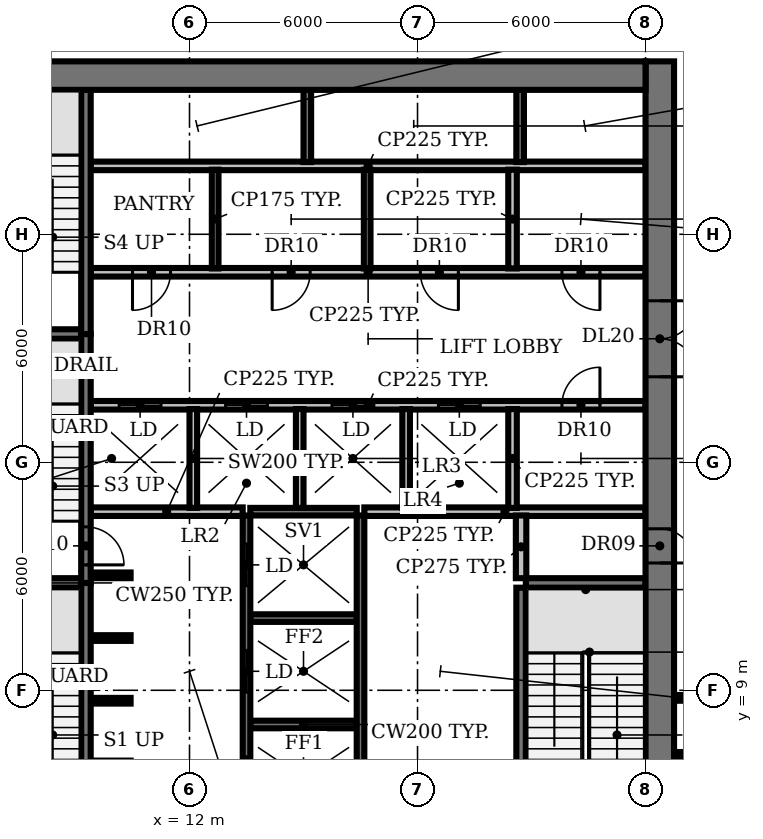
"""IFC4 building model, lengths in metres.
Left out: names, types, materials, properties, quantities, classifications, styles, units other than length and angle.
Written with IfcOpenShell. Run it as: python <this file> out.ifc"""

import sys

from ifc_helpers import new_model, si_unit, direction, frame, frame_2d, origin, place, context, subcontext, project, spatial, rectangle, extrude, element, fill, save


model = new_model("IFC4")
c1 = context("Model", 3, precision=1e-05, world=origin(), true_north=direction((0.0, 1.0)))
c2 = subcontext(c1, "Body", "Model", "MODEL_VIEW")
j1 = project(units=[si_unit("LENGTHUNIT", "METRE"), si_unit("PLANEANGLEUNIT", "RADIAN")], contexts=[c1])
p1 = place(None, origin())
s1 = spatial("IfcSite", under=j1, at=p1, CompositionType="ELEMENT")
p2 = place(p1, origin())
s2 = spatial("IfcBuilding", under=s1, at=p2, CompositionType="ELEMENT")
p3 = place(p2, frame((0.0, 0.0, 125.6)))
s3 = spatial("IfcBuildingStorey", under=s2, at=p3, CompositionType="ELEMENT", Elevation=125.6)
p4 = place(p3, frame((13.6, 8.1, 0.0), z_axis=(0.0, 0.0, 1.0), x_axis=(1.0, 0.0, 0.0)))
e1 = element("IfcWall", 1, at=p4, inside=s3, PredefinedType="SHEAR", context=c2, shape_type="SweptSolid", body=[
    extrude(rectangle(XDim=2.8, YDim=0.2, at=frame_2d((1.4, 0.0))), origin(), (0.0, 0.0, 1.0), 3.85),
])
for number, where, z_axis, x_axis in (
    (2, (9.4, 8.725, 0.0), (0.0, 0.0, 1.0), (1.0, 0.0, 0.0)),
    (3, (9.4, 10.375, 0.0), (0.0, 0.0, 1.0), (1.0, 0.0, 0.0)),
):
    element("IfcWall", number, at=place(p3, frame(where, z_axis=z_axis, x_axis=x_axis)), inside=s3, PredefinedType="SHEAR", context=c2, shape_type="SweptSolid", body=[
        extrude(rectangle(XDim=1.05, YDim=0.15, at=frame_2d((0.525, 0.0))), origin(), (0.0, 0.0, 1.0), 3.85),
    ])
p5 = place(p3, frame((13.6, 10.9, 0.0), z_axis=(0.0, 0.0, 1.0), x_axis=(1.0, 0.0, 0.0)))
e4 = element("IfcWall", 4, at=p5, inside=s3, PredefinedType="SHEAR", context=c2, shape_type="SweptSolid", body=[
    extrude(rectangle(XDim=2.8, YDim=0.2, at=frame_2d((1.4, 0.0))), origin(), (0.0, 0.0, 1.0), 3.85),
])
for number, where, z_axis, x_axis in (
    (5, (6.0, 11.825, 0.0), (0.0, 0.0, 1.0), (1.0, 0.0, 0.0)),
    (6, (20.85, 11.825, 0.0), (0.0, 0.0, 1.0), (1.0, 0.0, 0.0)),
):
    element("IfcWall", number, at=place(p3, frame(where, z_axis=z_axis, x_axis=x_axis)), inside=s3, PredefinedType="SHEAR", context=c2, shape_type="SweptSolid", body=[
        extrude(rectangle(XDim=3.15, YDim=0.25, at=frame_2d((1.575, 0.0))), origin(), (0.0, 0.0, 1.0), 3.85),
    ])
p6 = place(p3, frame((9.4, 12.025, 0.0), z_axis=(0.0, 0.0, 1.0), x_axis=(1.0, 0.0, 0.0)))
e7 = element("IfcWall", 7, at=p6, inside=s3, PredefinedType="SHEAR", context=c2, shape_type="SweptSolid", body=[
    extrude(rectangle(XDim=1.05, YDim=0.15, at=frame_2d((0.525, 0.0))), origin(), (0.0, 0.0, 1.0), 3.85),
])
p7 = place(p3, frame((9.4, 13.7, 0.0), z_axis=(0.0, 0.0, 1.0), x_axis=(1.0, 0.0, 0.0)))
e8 = element("IfcWall", 8, at=p7, inside=s3, PredefinedType="PARTITIONING", context=c2, shape_type="SweptSolid", body=[
    extrude(rectangle(XDim=4.0, YDim=0.225, at=frame_2d((2.0, 0.0))), origin(), (0.0, 0.0, 1.0), 3.85),
])
p8 = place(p3, frame((13.6, 13.7, 0.0), z_axis=(0.0, 0.0, 1.0), x_axis=(1.0, 0.0, 0.0)))
e9 = element("IfcWall", 9, at=p8, inside=s3, PredefinedType="SHEAR", context=c2, shape_type="SweptSolid", body=[
    extrude(rectangle(XDim=2.8, YDim=0.2, at=frame_2d((1.4, 0.0))), origin(), (0.0, 0.0, 1.0), 3.85),
])
p9 = place(p3, frame((16.6, 13.7, 0.0), z_axis=(0.0, 0.0, 1.0), x_axis=(1.0, 0.0, 0.0)))
e10 = element("IfcWall", 10, at=p9, inside=s3, PredefinedType="PARTITIONING", context=c2, shape_type="SweptSolid", body=[
    extrude(rectangle(XDim=7.4, YDim=0.225, at=frame_2d((3.7, 0.0))), origin(), (0.0, 0.0, 1.0), 3.85),
])
p10 = place(p3, frame((9.4, 16.5, 0.0), z_axis=(0.0, 0.0, 1.0), x_axis=(1.0, 0.0, 0.0)))
e11 = element("IfcWall", 11, at=p10, inside=s3, PredefinedType="PARTITIONING", context=c2, shape_type="SweptSolid", body=[
    extrude(rectangle(XDim=14.6, YDim=0.225, at=frame_2d((7.3, 0.0))), origin(), (0.0, 0.0, 1.0), 3.85),
])
p11 = place(p10, frame((0.75, 0.0, 0.0)))
e12 = element("IfcOpeningElement", 12, at=p11, cuts=e11, PredefinedType="OPENING", context=c2, shape_type="SweptSolid", body=[
    extrude(rectangle(XDim=1.1, YDim=2.1, at=frame_2d((0.55, 1.05))), frame((0.0, 0.123, 0.0), z_axis=(0.0, -1.0, 0.0), x_axis=(1.0, 0.0, 0.0)), (0.0, 0.0, 1.0), 0.245),
])
p12 = place(p10, frame((3.55, 0.0, 0.0)))
e13 = element("IfcOpeningElement", 13, at=p12, cuts=e11, PredefinedType="OPENING", context=c2, shape_type="SweptSolid", body=[
    extrude(rectangle(XDim=1.1, YDim=2.1, at=frame_2d((0.55, 1.05))), frame((0.0, 0.123, 0.0), z_axis=(0.0, -1.0, 0.0), x_axis=(1.0, 0.0, 0.0)), (0.0, 0.0, 1.0), 0.245),
])
p13 = place(p10, frame((6.35, 0.0, 0.0)))
e14 = element("IfcOpeningElement", 14, at=p13, cuts=e11, PredefinedType="OPENING", context=c2, shape_type="SweptSolid", body=[
    extrude(rectangle(XDim=1.1, YDim=2.1, at=frame_2d((0.55, 1.05))), frame((0.0, 0.123, 0.0), z_axis=(0.0, -1.0, 0.0), x_axis=(1.0, 0.0, 0.0)), (0.0, 0.0, 1.0), 0.245),
])
p14 = place(p10, frame((9.15, 0.0, 0.0)))
e15 = element("IfcOpeningElement", 15, at=p14, cuts=e11, PredefinedType="OPENING", context=c2, shape_type="SweptSolid", body=[
    extrude(rectangle(XDim=1.1, YDim=2.1, at=frame_2d((0.55, 1.05))), frame((0.0, 0.123, 0.0), z_axis=(0.0, -1.0, 0.0), x_axis=(1.0, 0.0, 0.0)), (0.0, 0.0, 1.0), 0.245),
])
p15 = place(p10, frame((12.4, 0.0, 0.0)))
e16 = element("IfcOpeningElement", 16, at=p15, cuts=e11, PredefinedType="OPENING", context=c2, shape_type="SweptSolid", body=[
    extrude(rectangle(XDim=1.0, YDim=2.1, at=frame_2d((0.5, 1.05))), frame((0.0, 0.123, 0.0), z_axis=(0.0, -1.0, 0.0), x_axis=(1.0, 0.0, 0.0)), (0.0, 0.0, 1.0), 0.245),
])
p16 = place(p3, frame((6.0, 18.375, 0.0), z_axis=(0.0, 0.0, 1.0), x_axis=(1.0, 0.0, 0.0)))
e17 = element("IfcWall", 17, at=p16, inside=s3, PredefinedType="SHEAR", context=c2, shape_type="SweptSolid", body=[
    extrude(rectangle(XDim=3.15, YDim=0.25, at=frame_2d((1.575, 0.0))), origin(), (0.0, 0.0, 1.0), 3.85),
])
p17 = place(p3, frame((24.0, 20.0, 0.0), z_axis=(0.0, 0.0, 1.0), x_axis=(-1.0, 0.0, 0.0)))
e18 = element("IfcWall", 18, at=p17, inside=s3, PredefinedType="PARTITIONING", context=c2, shape_type="SweptSolid", body=[
    extrude(rectangle(XDim=14.6, YDim=0.225, at=frame_2d((7.3, 0.0))), origin(), (0.0, 0.0, 1.0), 3.85),
])
p18 = place(p17, frame((12.5, 0.0, 0.0)))
e19 = element("IfcOpeningElement", 19, at=p18, cuts=e18, PredefinedType="OPENING", context=c2, shape_type="SweptSolid", body=[
    extrude(rectangle(XDim=1.0, YDim=2.1, at=frame_2d((0.5, 1.05))), frame((0.0, 0.123, 0.0), z_axis=(0.0, -1.0, 0.0), x_axis=(1.0, 0.0, 0.0)), (0.0, 0.0, 1.0), 0.245),
])
p19 = place(p17, frame((8.825, 0.0, 0.0)))
e20 = element("IfcOpeningElement", 20, at=p19, cuts=e18, PredefinedType="OPENING", context=c2, shape_type="SweptSolid", body=[
    extrude(rectangle(XDim=1.0, YDim=2.1, at=frame_2d((0.5, 1.05))), frame((0.0, 0.123, 0.0), z_axis=(0.0, -1.0, 0.0), x_axis=(1.0, 0.0, 0.0)), (0.0, 0.0, 1.0), 0.245),
])
p20 = place(p17, frame((4.925, 0.0, 0.0)))
e21 = element("IfcOpeningElement", 21, at=p20, cuts=e18, PredefinedType="OPENING", context=c2, shape_type="SweptSolid", body=[
    extrude(rectangle(XDim=1.0, YDim=2.1, at=frame_2d((0.5, 1.05))), frame((0.0, 0.123, 0.0), z_axis=(0.0, -1.0, 0.0), x_axis=(1.0, 0.0, 0.0)), (0.0, 0.0, 1.0), 0.245),
])
p21 = place(p17, frame((1.2, 0.0, 0.0)))
e22 = element("IfcOpeningElement", 22, at=p21, cuts=e18, PredefinedType="OPENING", context=c2, shape_type="SweptSolid", body=[
    extrude(rectangle(XDim=1.0, YDim=2.1, at=frame_2d((0.5, 1.05))), frame((0.0, 0.123, 0.0), z_axis=(0.0, -1.0, 0.0), x_axis=(1.0, 0.0, 0.0)), (0.0, 0.0, 1.0), 0.245),
])
p22 = place(p3, frame((9.4, 22.8, 0.0), z_axis=(0.0, 0.0, 1.0), x_axis=(1.0, 0.0, 0.0)))
e23 = element("IfcWall", 23, at=p22, inside=s3, PredefinedType="PARTITIONING", context=c2, shape_type="SweptSolid", body=[
    extrude(rectangle(XDim=14.6, YDim=0.225, at=frame_2d((7.3, 0.0))), origin(), (0.0, 0.0, 1.0), 3.85),
])
p23 = place(p3, frame((9.275, 11.825, 0.0), z_axis=(0.0, 0.0, 1.0), x_axis=(0.0, -1.0, 0.0)))
e24 = element("IfcWall", 24, at=p23, inside=s3, PredefinedType="SHEAR", context=c2, shape_type="SweptSolid", body=[
    extrude(rectangle(XDim=6.425, YDim=0.25, at=frame_2d((3.212, 0.0))), origin(), (0.0, 0.0, 1.0), 3.85),
])
p24 = place(p23, frame((5.075, 0.0, 0.0)))
e25 = element("IfcOpeningElement", 25, at=p24, cuts=e24, PredefinedType="OPENING", context=c2, shape_type="SweptSolid", body=[
    extrude(rectangle(XDim=1.0, YDim=2.1, at=frame_2d((0.5, 1.05))), frame((0.0, 0.135, 0.0), z_axis=(0.0, -1.0, 0.0), x_axis=(1.0, 0.0, 0.0)), (0.0, 0.0, 1.0), 0.27),
])
p25 = place(p3, frame((9.275, 18.375, 0.0), z_axis=(0.0, 0.0, 1.0), x_axis=(0.0, -1.0, 0.0)))
e26 = element("IfcWall", 26, at=p25, inside=s3, PredefinedType="SHEAR", context=c2, shape_type="SweptSolid", body=[
    extrude(rectangle(XDim=6.55, YDim=0.25, at=frame_2d((3.275, 0.0))), origin(), (0.0, 0.0, 1.0), 3.85),
])
p26 = place(p25, frame((5.075, 0.0, 0.0)))
e27 = element("IfcOpeningElement", 27, at=p26, cuts=e26, PredefinedType="OPENING", context=c2, shape_type="SweptSolid", body=[
    extrude(rectangle(XDim=1.0, YDim=2.1, at=frame_2d((0.5, 1.05))), frame((0.0, 0.135, 0.0), z_axis=(0.0, -1.0, 0.0), x_axis=(1.0, 0.0, 0.0)), (0.0, 0.0, 1.0), 0.27),
])
p27 = place(p3, frame((9.275, 18.375, 0.0), z_axis=(0.0, 0.0, 1.0), x_axis=(0.0, 1.0, 0.0)))
e28 = element("IfcWall", 28, at=p27, inside=s3, PredefinedType="SHEAR", context=c2, shape_type="SweptSolid", body=[
    extrude(rectangle(XDim=6.425, YDim=0.25, at=frame_2d((3.212, 0.0))), origin(), (0.0, 0.0, 1.0), 3.85),
])
p28 = place(p3, frame((12.1, 13.8, 0.0), z_axis=(0.0, 0.0, 1.0), x_axis=(0.0, 1.0, 0.0)))
e29 = element("IfcWall", 29, at=p28, inside=s3, PredefinedType="SOLIDWALL", context=c2, shape_type="SweptSolid", body=[
    extrude(rectangle(XDim=2.6, YDim=0.2, at=frame_2d((1.3, 0.0))), origin(), (0.0, 0.0, 1.0), 3.85),
])
p29 = place(p3, frame((12.675, 20.1, 0.0), z_axis=(0.0, 0.0, 1.0), x_axis=(0.0, 1.0, 0.0)))
e30 = element("IfcWall", 30, at=p29, inside=s3, PredefinedType="PARTITIONING", context=c2, shape_type="SweptSolid", body=[
    extrude(rectangle(XDim=2.6, YDim=0.175, at=frame_2d((1.3, 0.0))), origin(), (0.0, 0.0, 1.0), 3.85),
])
p30 = place(p3, frame((13.5, 5.4, 0.0), z_axis=(0.0, 0.0, 1.0), x_axis=(0.0, 1.0, 0.0)))
e31 = element("IfcWall", 31, at=p30, inside=s3, PredefinedType="SHEAR", context=c2, shape_type="SweptSolid", body=[
    extrude(rectangle(XDim=8.2, YDim=0.2, at=frame_2d((4.1, 0.0))), origin(), (0.0, 0.0, 1.0), 3.85),
])
p31 = place(p30, frame((0.75, 0.0, 0.0)))
e32 = element("IfcOpeningElement", 32, at=p31, cuts=e31, PredefinedType="OPENING", context=c2, shape_type="SweptSolid", body=[
    extrude(rectangle(XDim=1.1, YDim=2.1, at=frame_2d((0.55, 1.05))), frame((0.0, 0.11, 0.0), z_axis=(0.0, -1.0, 0.0), x_axis=(1.0, 0.0, 0.0)), (0.0, 0.0, 1.0), 0.22),
])
p32 = place(p30, frame((3.55, 0.0, 0.0)))
e33 = element("IfcOpeningElement", 33, at=p32, cuts=e31, PredefinedType="OPENING", context=c2, shape_type="SweptSolid", body=[
    extrude(rectangle(XDim=1.1, YDim=2.1, at=frame_2d((0.55, 1.05))), frame((0.0, 0.11, 0.0), z_axis=(0.0, -1.0, 0.0), x_axis=(1.0, 0.0, 0.0)), (0.0, 0.0, 1.0), 0.22),
])
p33 = place(p30, frame((6.35, 0.0, 0.0)))
e34 = element("IfcOpeningElement", 34, at=p33, cuts=e31, PredefinedType="OPENING", context=c2, shape_type="SweptSolid", body=[
    extrude(rectangle(XDim=1.1, YDim=2.1, at=frame_2d((0.55, 1.05))), frame((0.0, 0.11, 0.0), z_axis=(0.0, -1.0, 0.0), x_axis=(1.0, 0.0, 0.0)), (0.0, 0.0, 1.0), 0.22),
])
p34 = place(p3, frame((14.9, 13.8, 0.0), z_axis=(0.0, 0.0, 1.0), x_axis=(0.0, 1.0, 0.0)))
e35 = element("IfcWall", 35, at=p34, inside=s3, PredefinedType="SOLIDWALL", context=c2, shape_type="SweptSolid", body=[
    extrude(rectangle(XDim=2.6, YDim=0.2, at=frame_2d((1.3, 0.0))), origin(), (0.0, 0.0, 1.0), 3.85),
])
p35 = place(p3, frame((15.1, 22.9, 0.0), z_axis=(0.0, 0.0, 1.0), x_axis=(0.0, 1.0, 0.0)))
e36 = element("IfcWall", 36, at=p35, inside=s3, PredefinedType="SHEAR", context=c2, shape_type="SweptSolid", body=[
    extrude(rectangle(XDim=1.9, YDim=0.2, at=frame_2d((0.95, 0.0))), origin(), (0.0, 0.0, 1.0), 3.85),
])
p36 = place(p3, frame((16.5, 5.4, 0.0), z_axis=(0.0, 0.0, 1.0), x_axis=(0.0, 1.0, 0.0)))
e37 = element("IfcWall", 37, at=p36, inside=s3, PredefinedType="SHEAR", context=c2, shape_type="SweptSolid", body=[
    extrude(rectangle(XDim=8.2, YDim=0.2, at=frame_2d((4.1, 0.0))), origin(), (0.0, 0.0, 1.0), 3.85),
])
p37 = place(p3, frame((16.675, 20.1, 0.0), z_axis=(0.0, 0.0, 1.0), x_axis=(0.0, 1.0, 0.0)))
e38 = element("IfcWall", 38, at=p37, inside=s3, PredefinedType="PARTITIONING", context=c2, shape_type="SweptSolid", body=[
    extrude(rectangle(XDim=2.6, YDim=0.175, at=frame_2d((1.3, 0.0))), origin(), (0.0, 0.0, 1.0), 3.85),
])
p38 = place(p3, frame((17.7, 13.8, 0.0), z_axis=(0.0, 0.0, 1.0), x_axis=(0.0, 1.0, 0.0)))
e39 = element("IfcWall", 39, at=p38, inside=s3, PredefinedType="SOLIDWALL", context=c2, shape_type="SweptSolid", body=[
    extrude(rectangle(XDim=2.6, YDim=0.2, at=frame_2d((1.3, 0.0))), origin(), (0.0, 0.0, 1.0), 3.85),
])
for number, where, z_axis, x_axis in (
    (40, (20.5, 13.8, 0.0), (0.0, 0.0, 1.0), (0.0, 1.0, 0.0)),
    (41, (20.5, 20.1, 0.0), (0.0, 0.0, 1.0), (0.0, 1.0, 0.0)),
):
    element("IfcWall", number, at=place(p3, frame(where, z_axis=z_axis, x_axis=x_axis)), inside=s3, PredefinedType="PARTITIONING", context=c2, shape_type="SweptSolid", body=[
        extrude(rectangle(XDim=2.6, YDim=0.225, at=frame_2d((1.3, 0.0))), origin(), (0.0, 0.0, 1.0), 3.85),
    ])
p39 = place(p3, frame((20.7, 22.9, 0.0), z_axis=(0.0, 0.0, 1.0), x_axis=(0.0, 1.0, 0.0)))
e42 = element("IfcWall", 42, at=p39, inside=s3, PredefinedType="SHEAR", context=c2, shape_type="SweptSolid", body=[
    extrude(rectangle(XDim=1.9, YDim=0.2, at=frame_2d((0.95, 0.0))), origin(), (0.0, 0.0, 1.0), 3.85),
])
p40 = place(p3, frame((20.725, 5.4, 0.0), z_axis=(0.0, 0.0, 1.0), x_axis=(0.0, 1.0, 0.0)))
e43 = element("IfcWall", 43, at=p40, inside=s3, PredefinedType="SHEAR", context=c2, shape_type="SweptSolid", body=[
    extrude(rectangle(XDim=6.3, YDim=0.25, at=frame_2d((3.15, 0.0))), origin(), (0.0, 0.0, 1.0), 3.85),
])
p41 = place(p3, frame((20.725, 11.95, 0.0), z_axis=(0.0, 0.0, 1.0), x_axis=(0.0, 1.0, 0.0)))
e44 = element("IfcWall", 44, at=p41, inside=s3, PredefinedType="PARTITIONING", context=c2, shape_type="SweptSolid", body=[
    extrude(rectangle(XDim=1.65, YDim=0.275, at=frame_2d((0.825, 0.0))), origin(), (0.0, 0.0, 1.0), 3.85),
])
p42 = place(p3, frame((24.375, 25.55, 0.0), z_axis=(0.0, 0.0, 1.0), x_axis=(0.0, -1.0, 0.0)))
e45 = element("IfcWall", 45, at=p42, inside=s3, PredefinedType="SHEAR", context=c2, shape_type="SweptSolid", body=[
    extrude(rectangle(XDim=21.13, YDim=0.75, at=frame_2d((10.565, 0.0))), origin(), (0.0, 0.0, 1.0), 3.85),
])
p43 = place(p42, frame((18.4, 0.0, 0.0)))
e46 = element("IfcOpeningElement", 46, at=p43, cuts=e45, PredefinedType="OPENING", context=c2, shape_type="SweptSolid", body=[
    extrude(rectangle(XDim=1.5, YDim=2.1, at=frame_2d((0.75, 1.05))), frame((0.0, 0.385, 0.0), z_axis=(0.0, -1.0, 0.0), x_axis=(1.0, 0.0, 0.0)), (0.0, 0.0, 1.0), 0.77),
])
p44 = place(p42, frame((12.3, 0.0, 0.0)))
e47 = element("IfcOpeningElement", 47, at=p44, cuts=e45, PredefinedType="OPENING", context=c2, shape_type="SweptSolid", body=[
    extrude(rectangle(XDim=0.9, YDim=2.1, at=frame_2d((0.45, 1.05))), frame((0.0, 0.385, 0.0), z_axis=(0.0, -1.0, 0.0), x_axis=(1.0, 0.0, 0.0)), (0.0, 0.0, 1.0), 0.77),
])
p45 = place(p42, frame((6.3, 0.0, 0.0)))
e48 = element("IfcOpeningElement", 48, at=p45, cuts=e45, PredefinedType="OPENING", context=c2, shape_type="SweptSolid", body=[
    extrude(rectangle(XDim=2.0, YDim=2.1, at=frame_2d((1.0, 1.05))), frame((0.0, 0.385, 0.0), z_axis=(0.0, -1.0, 0.0), x_axis=(1.0, 0.0, 0.0)), (0.0, 0.0, 1.0), 0.77),
])
p46 = place(p3, frame((6.0, 25.175, 0.0), z_axis=(0.0, 0.0, 1.0), x_axis=(1.0, 0.0, 0.0)))
e49 = element("IfcWall", 49, at=p46, inside=s3, PredefinedType="SHEAR", context=c2, shape_type="SweptSolid", body=[
    extrude(rectangle(XDim=18.0, YDim=0.75, at=frame_2d((9.0, 0.0))), origin(), (0.0, 0.0, 1.0), 3.85),
])
for number, where, z_axis, x_axis in (
    (50, (24.75, 7.3, 0.0), (0.0, 0.0, 1.0), (1.0, 0.0, 0.0)),
    (51, (24.75, 8.8, 0.0), (0.0, 0.0, 1.0), (1.0, 0.0, 0.0)),
):
    element("IfcWall", number, at=place(p3, frame(where, z_axis=z_axis, x_axis=x_axis)), inside=s3, PredefinedType="PARTITIONING", context=c2, shape_type="SweptSolid", body=[
        extrude(rectangle(XDim=1.05, YDim=0.15, at=frame_2d((0.525, 0.0))), origin(), (0.0, 0.0, 1.0), 2.83),
    ])
p47 = place(p11, origin())
e52 = element("IfcDoor", 52, at=p47, inside=s3, OperationType="DOUBLE_DOOR_SLIDING", PredefinedType="DOOR", context=c2, shape_type="SweptSolid", body=[
    extrude(rectangle(XDim=1.1, YDim=2.1, at=frame_2d((0.55, 1.05))), frame((0.0, 0.025, 0.0), z_axis=(0.0, -1.0, 0.0), x_axis=(1.0, 0.0, 0.0)), (0.0, 0.0, 1.0), 0.05),
])
fill(e12, e52)
p48 = place(p12, origin())
e53 = element("IfcDoor", 53, at=p48, inside=s3, OperationType="DOUBLE_DOOR_SLIDING", PredefinedType="DOOR", context=c2, shape_type="SweptSolid", body=[
    extrude(rectangle(XDim=1.1, YDim=2.1, at=frame_2d((0.55, 1.05))), frame((0.0, 0.025, 0.0), z_axis=(0.0, -1.0, 0.0), x_axis=(1.0, 0.0, 0.0)), (0.0, 0.0, 1.0), 0.05),
])
fill(e13, e53)
p49 = place(p13, origin())
e54 = element("IfcDoor", 54, at=p49, inside=s3, OperationType="DOUBLE_DOOR_SLIDING", PredefinedType="DOOR", context=c2, shape_type="SweptSolid", body=[
    extrude(rectangle(XDim=1.1, YDim=2.1, at=frame_2d((0.55, 1.05))), frame((0.0, 0.025, 0.0), z_axis=(0.0, -1.0, 0.0), x_axis=(1.0, 0.0, 0.0)), (0.0, 0.0, 1.0), 0.05),
])
fill(e14, e54)
p50 = place(p14, origin())
e55 = element("IfcDoor", 55, at=p50, inside=s3, OperationType="DOUBLE_DOOR_SLIDING", PredefinedType="DOOR", context=c2, shape_type="SweptSolid", body=[
    extrude(rectangle(XDim=1.1, YDim=2.1, at=frame_2d((0.55, 1.05))), frame((0.0, 0.025, 0.0), z_axis=(0.0, -1.0, 0.0), x_axis=(1.0, 0.0, 0.0)), (0.0, 0.0, 1.0), 0.05),
])
fill(e15, e55)
p51 = place(p15, origin())
e56 = element("IfcDoor", 56, at=p51, inside=s3, OperationType="SINGLE_SWING_RIGHT", PredefinedType="DOOR", context=c2, shape_type="SweptSolid", body=[
    extrude(rectangle(XDim=1.0, YDim=2.1, at=frame_2d((0.5, 1.05))), frame((0.0, 0.025, 0.0), z_axis=(0.0, -1.0, 0.0), x_axis=(1.0, 0.0, 0.0)), (0.0, 0.0, 1.0), 0.05),
])
fill(e16, e56)
p52 = place(p18, origin())
e57 = element("IfcDoor", 57, at=p52, inside=s3, OperationType="SINGLE_SWING_RIGHT", PredefinedType="DOOR", context=c2, shape_type="SweptSolid", body=[
    extrude(rectangle(XDim=1.0, YDim=2.1, at=frame_2d((0.5, 1.05))), frame((0.0, 0.025, 0.0), z_axis=(0.0, -1.0, 0.0), x_axis=(1.0, 0.0, 0.0)), (0.0, 0.0, 1.0), 0.05),
])
fill(e19, e57)
p53 = place(p19, origin())
e58 = element("IfcDoor", 58, at=p53, inside=s3, OperationType="SINGLE_SWING_RIGHT", PredefinedType="DOOR", context=c2, shape_type="SweptSolid", body=[
    extrude(rectangle(XDim=1.0, YDim=2.1, at=frame_2d((0.5, 1.05))), frame((0.0, 0.025, 0.0), z_axis=(0.0, -1.0, 0.0), x_axis=(1.0, 0.0, 0.0)), (0.0, 0.0, 1.0), 0.05),
])
fill(e20, e58)
p54 = place(p20, origin())
e59 = element("IfcDoor", 59, at=p54, inside=s3, OperationType="SINGLE_SWING_LEFT", PredefinedType="DOOR", context=c2, shape_type="SweptSolid", body=[
    extrude(rectangle(XDim=1.0, YDim=2.1, at=frame_2d((0.5, 1.05))), frame((0.0, 0.025, 0.0), z_axis=(0.0, -1.0, 0.0), x_axis=(1.0, 0.0, 0.0)), (0.0, 0.0, 1.0), 0.05),
])
fill(e21, e59)
p55 = place(p21, origin())
e60 = element("IfcDoor", 60, at=p55, inside=s3, OperationType="SINGLE_SWING_LEFT", PredefinedType="DOOR", context=c2, shape_type="SweptSolid", body=[
    extrude(rectangle(XDim=1.0, YDim=2.1, at=frame_2d((0.5, 1.05))), frame((0.0, 0.025, 0.0), z_axis=(0.0, -1.0, 0.0), x_axis=(1.0, 0.0, 0.0)), (0.0, 0.0, 1.0), 0.05),
])
fill(e22, e60)
p56 = place(p26, origin())
e61 = element("IfcDoor", 61, at=p56, inside=s3, OperationType="SINGLE_SWING_RIGHT", PredefinedType="DOOR", context=c2, shape_type="SweptSolid", body=[
    extrude(rectangle(XDim=1.0, YDim=2.1, at=frame_2d((0.5, 1.05))), frame((0.0, 0.025, 0.0), z_axis=(0.0, -1.0, 0.0), x_axis=(1.0, 0.0, 0.0)), (0.0, 0.0, 1.0), 0.05),
])
fill(e27, e61)
p57 = place(p31, origin())
e62 = element("IfcDoor", 62, at=p57, inside=s3, OperationType="DOUBLE_DOOR_SLIDING", PredefinedType="DOOR", context=c2, shape_type="SweptSolid", body=[
    extrude(rectangle(XDim=1.1, YDim=2.1, at=frame_2d((0.55, 1.05))), frame((0.0, 0.025, 0.0), z_axis=(0.0, -1.0, 0.0), x_axis=(1.0, 0.0, 0.0)), (0.0, 0.0, 1.0), 0.05),
])
fill(e32, e62)
p58 = place(p32, origin())
e63 = element("IfcDoor", 63, at=p58, inside=s3, OperationType="DOUBLE_DOOR_SLIDING", PredefinedType="DOOR", context=c2, shape_type="SweptSolid", body=[
    extrude(rectangle(XDim=1.1, YDim=2.1, at=frame_2d((0.55, 1.05))), frame((0.0, 0.025, 0.0), z_axis=(0.0, -1.0, 0.0), x_axis=(1.0, 0.0, 0.0)), (0.0, 0.0, 1.0), 0.05),
])
fill(e33, e63)
p59 = place(p33, origin())
e64 = element("IfcDoor", 64, at=p59, inside=s3, OperationType="DOUBLE_DOOR_SLIDING", PredefinedType="DOOR", context=c2, shape_type="SweptSolid", body=[
    extrude(rectangle(XDim=1.1, YDim=2.1, at=frame_2d((0.55, 1.05))), frame((0.0, 0.025, 0.0), z_axis=(0.0, -1.0, 0.0), x_axis=(1.0, 0.0, 0.0)), (0.0, 0.0, 1.0), 0.05),
])
fill(e34, e64)
p60 = place(p44, origin())
e65 = element("IfcDoor", 65, at=p60, inside=s3, OperationType="SINGLE_SWING_RIGHT", PredefinedType="DOOR", context=c2, shape_type="SweptSolid", body=[
    extrude(rectangle(XDim=0.9, YDim=2.1, at=frame_2d((0.45, 1.05))), frame((0.0, -0.315, 0.0), z_axis=(0.0, -1.0, 0.0), x_axis=(1.0, 0.0, 0.0)), (0.0, 0.0, 1.0), 0.05),
])
fill(e47, e65)
p61 = place(p45, origin())
e66 = element("IfcDoor", 66, at=p61, inside=s3, OperationType="DOUBLE_DOOR_SINGLE_SWING", PredefinedType="DOOR", context=c2, shape_type="SweptSolid", body=[
    extrude(rectangle(XDim=2.0, YDim=2.1, at=frame_2d((1.0, 1.05))), frame((0.0, 0.025, 0.0), z_axis=(0.0, -1.0, 0.0), x_axis=(1.0, 0.0, 0.0)), (0.0, 0.0, 1.0), 0.05),
])
fill(e48, e66)
save(model, sys.argv[1])
